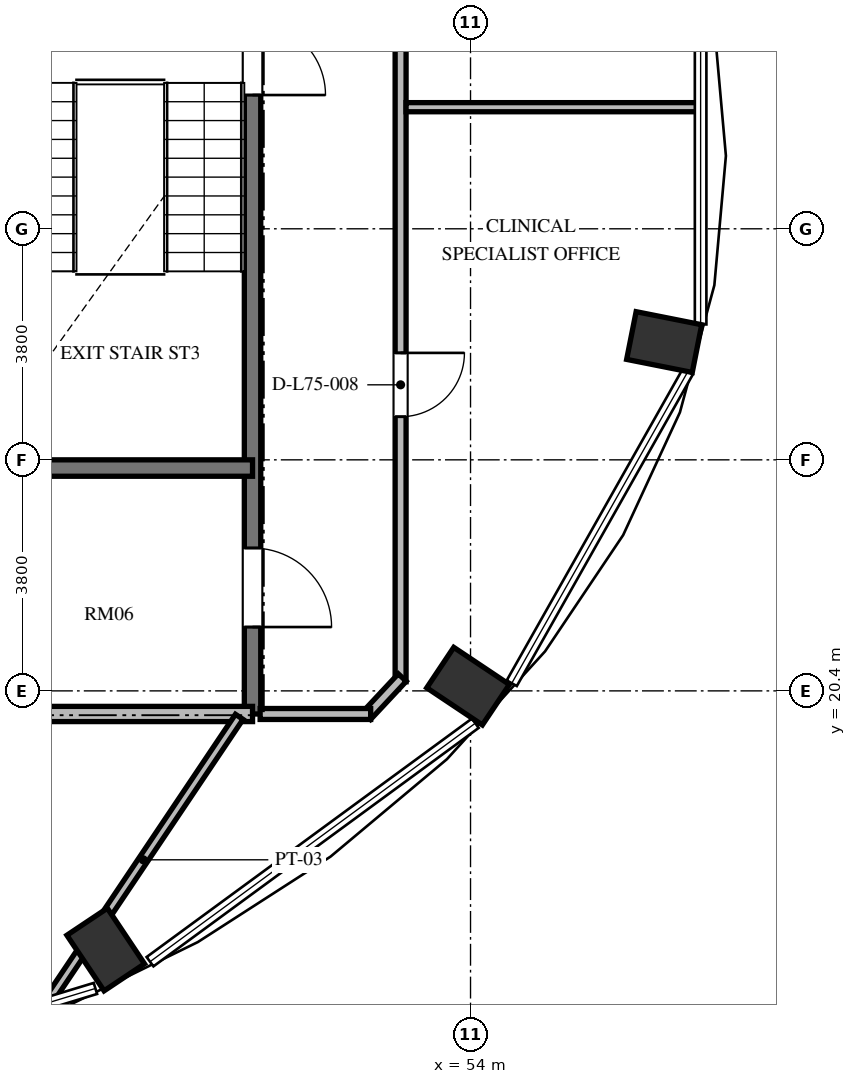
"""IFC4 building model, lengths in metres.
Left out: names, types, materials, properties, quantities, classifications, styles, units other than length and angle.
Written with IfcOpenShell. Run it as: python <this file> out.ifc"""

import sys

from ifc_helpers import new_model, si_unit, direction, frame, frame_2d, origin, origin_2d, place, context, subcontext, project, spatial, rectangle, extrude, element, fill, save


model = new_model("IFC4")
c1 = context("Model", 3, precision=1e-05, world=origin(), true_north=direction((0.0, 1.0)))
c2 = subcontext(c1, "Body", "Model", "MODEL_VIEW")
j1 = project(units=[si_unit("LENGTHUNIT", "METRE"), si_unit("PLANEANGLEUNIT", "RADIAN")], contexts=[c1])
p1 = place(None, origin())
s1 = spatial("IfcSite", under=j1, at=p1, CompositionType="ELEMENT")
p2 = place(p1, origin())
s2 = spatial("IfcBuilding", under=s1, at=p2, CompositionType="ELEMENT")
p3 = place(p2, frame((0.0, 0.0, 287.856)))
s3 = spatial("IfcBuildingStorey", under=s2, at=p3, CompositionType="ELEMENT", Elevation=287.856)
for number, where, z_axis, x_axis in (
    (1, (48.0, 16.146, 0.0), (0.0, 0.0, 1.0), (0.556, -0.831, 0.0)),
    (2, (53.96, 20.478, 0.0), (0.0, 0.0, 1.0), (0.831, -0.556, 0.0)),
    (3, (57.185, 26.137, 0.0), (0.0, 0.0, 1.0), (0.981, -0.195, 0.0)),
):
    element("IfcColumn", number, at=place(p3, frame(where, z_axis=z_axis, x_axis=x_axis)), inside=s3, PredefinedType="COLUMN", context=c2, shape_type="SweptSolid", body=[
        extrude(rectangle(XDim=1.1, YDim=0.8, at=origin_2d()), origin(), (0.0, 0.0, 1.0), 3.648),
    ])
p4 = place(p3, frame((50.415, 35.845, 0.0), z_axis=(0.0, 0.0, 1.0), x_axis=(0.0, -1.0, 0.0)))
e4 = element("IfcWall", 4, at=p4, inside=s3, PredefinedType="SHEAR", context=c2, shape_type="SweptSolid", body=[
    extrude(rectangle(XDim=15.825, YDim=0.27, at=frame_2d((7.913, 0.0))), origin(), (0.0, 0.0, 1.0), 3.648),
])
p5 = place(p4, frame((4.445, 0.0, 0.0)))
e5 = element("IfcOpeningElement", 5, at=p5, cuts=e4, PredefinedType="OPENING", context=c2, shape_type="SweptSolid", body=[
    extrude(rectangle(XDim=1.2, YDim=2.15, at=frame_2d((0.6, 1.075))), frame((0.0, 0.145, 0.0), z_axis=(0.0, -1.0, 0.0), x_axis=(1.0, 0.0, 0.0)), (0.0, 0.0, 1.0), 0.29),
])
p6 = place(p4, frame((1.295, 0.0, 0.0)))
e6 = element("IfcOpeningElement", 6, at=p6, cuts=e4, PredefinedType="OPENING", context=c2, shape_type="SweptSolid", body=[
    extrude(rectangle(XDim=1.3, YDim=2.2, at=frame_2d((0.65, 1.1))), frame((0.0, 0.145, 0.0), z_axis=(0.0, -1.0, 0.0), x_axis=(1.0, 0.0, 0.0)), (0.0, 0.0, 1.0), 0.29),
])
p7 = place(p4, frame((13.095, 0.0, 0.0)))
e7 = element("IfcOpeningElement", 7, at=p7, cuts=e4, PredefinedType="OPENING", context=c2, shape_type="SweptSolid", body=[
    extrude(rectangle(XDim=1.3, YDim=2.2, at=frame_2d((0.65, 1.1))), frame((0.0, 0.145, 0.0), z_axis=(0.0, -1.0, 0.0), x_axis=(1.0, 0.0, 0.0)), (0.0, 0.0, 1.0), 0.29),
])
p8 = place(p3, frame((45.7, 24.065, 0.0), z_axis=(0.0, 0.0, 1.0), x_axis=(1.0, 0.0, 0.0)))
e8 = element("IfcWall", 8, at=p8, inside=s3, PredefinedType="SHEAR", context=c2, shape_type="SweptSolid", body=[
    extrude(rectangle(XDim=4.715, YDim=0.27, at=frame_2d((2.357, 0.0))), origin(), (0.0, 0.0, 1.0), 3.648),
])
p9 = place(p3, frame((45.7, 20.02, 0.0), z_axis=(0.0, 0.0, 1.0), x_axis=(1.0, 0.0, 0.0)))
e9 = element("IfcWall", 9, at=p9, inside=s3, PredefinedType="SOLIDWALL", context=c2, shape_type="SweptSolid", body=[
    extrude(rectangle(XDim=4.715, YDim=0.25, at=frame_2d((2.357, 0.0))), origin(), (0.0, 0.0, 1.0), 3.448),
])
p10 = place(p3, frame((52.85, 37.85, 0.0), z_axis=(0.0, 0.0, 1.0), x_axis=(0.0, -1.0, 0.0)))
e10 = element("IfcWall", 10, at=p10, inside=s3, PredefinedType="PARTITIONING", context=c2, shape_type="SweptSolid", body=[
    extrude(rectangle(XDim=17.3, YDim=0.18, at=frame_2d((8.65, 0.0))), origin(), (0.0, 0.0, 1.0), 3.448),
])
p11 = place(p10, frame((11.891, 0.0, 0.0)))
e11 = element("IfcOpeningElement", 11, at=p11, cuts=e10, PredefinedType="OPENING", context=c2, shape_type="SweptSolid", body=[
    extrude(rectangle(XDim=1.05, YDim=2.15, at=frame_2d((0.525, 1.075))), frame((0.0, 0.1, 0.0), z_axis=(0.0, -1.0, 0.0), x_axis=(1.0, 0.0, 0.0)), (0.0, 0.0, 1.0), 0.2),
])
p12 = place(p3, frame((52.877, 20.619, 0.0), z_axis=(0.0, 0.0, 1.0), x_axis=(-0.682409308253, -0.730970270264, 0.0)))
e12 = element("IfcWall", 12, at=p12, inside=s3, PredefinedType="PARTITIONING", context=c2, shape_type="SweptSolid", body=[
    extrude(rectangle(XDim=0.86, YDim=0.18, at=frame_2d((0.43, 0.0))), origin(), (0.0, 0.0, 1.0), 3.448),
])
p13 = place(p3, frame((52.358, 20.02, 0.0), z_axis=(0.0, 0.0, 1.0), x_axis=(-1.0, 0.0, 0.0)))
e13 = element("IfcWall", 13, at=p13, inside=s3, PredefinedType="PARTITIONING", context=c2, shape_type="SweptSolid", body=[
    extrude(rectangle(XDim=1.818, YDim=0.18, at=frame_2d((0.909, 0.0))), origin(), (0.0, 0.0, 1.0), 3.448),
])
p14 = place(p3, frame((52.94, 30.0, 0.0), z_axis=(0.0, 0.0, 1.0), x_axis=(1.0, 0.0, 0.0)))
e14 = element("IfcWall", 14, at=p14, inside=s3, PredefinedType="PARTITIONING", context=c2, shape_type="SweptSolid", body=[
    extrude(rectangle(XDim=4.832, YDim=0.15, at=frame_2d((2.416, 0.0))), origin(), (0.0, 0.0, 1.0), 3.448),
])
p15 = place(p3, frame((50.196, 19.973, 0.0), z_axis=(0.0, 0.0, 1.0), x_axis=(-0.557432490255, -0.830222270725, 0.0)))
e15 = element("IfcWall", 15, at=p15, inside=s3, PredefinedType="PARTITIONING", context=c2, shape_type="SweptSolid", body=[
    extrude(rectangle(XDim=5.664, YDim=0.15, at=frame_2d((2.832, 0.0))), origin(), (0.0, 0.0, 1.0), 3.448),
])
p16 = place(p5, origin())
e16 = element("IfcDoor", 16, at=p16, inside=s3, OperationType="SINGLE_SWING_RIGHT", PredefinedType="DOOR", context=c2, shape_type="SweptSolid", body=[
    extrude(rectangle(XDim=1.2, YDim=2.15, at=frame_2d((0.6, 1.075))), frame((0.0, 0.025, 0.0), z_axis=(0.0, -1.0, 0.0), x_axis=(1.0, 0.0, 0.0)), (0.0, 0.0, 1.0), 0.05),
])
fill(e5, e16)
p17 = place(p7, origin())
e17 = element("IfcDoor", 17, at=p17, inside=s3, OperationType="SINGLE_SWING_RIGHT", PredefinedType="DOOR", context=c2, shape_type="SweptSolid", body=[
    extrude(rectangle(XDim=1.3, YDim=2.2, at=frame_2d((0.65, 1.1))), frame((0.0, 0.025, 0.0), z_axis=(0.0, -1.0, 0.0), x_axis=(1.0, 0.0, 0.0)), (0.0, 0.0, 1.0), 0.05),
])
fill(e7, e17)
p18 = place(p11, origin())
e18 = element("IfcDoor", 18, at=p18, inside=s3, OperationType="SINGLE_SWING_LEFT", PredefinedType="DOOR", context=c2, shape_type="SweptSolid", body=[
    extrude(rectangle(XDim=1.05, YDim=2.15, at=frame_2d((0.525, 1.075))), frame((0.0, 0.025, 0.0), z_axis=(0.0, -1.0, 0.0), x_axis=(1.0, 0.0, 0.0)), (0.0, 0.0, 1.0), 0.05),
])
fill(e11, e18)
save(model, sys.argv[1])
